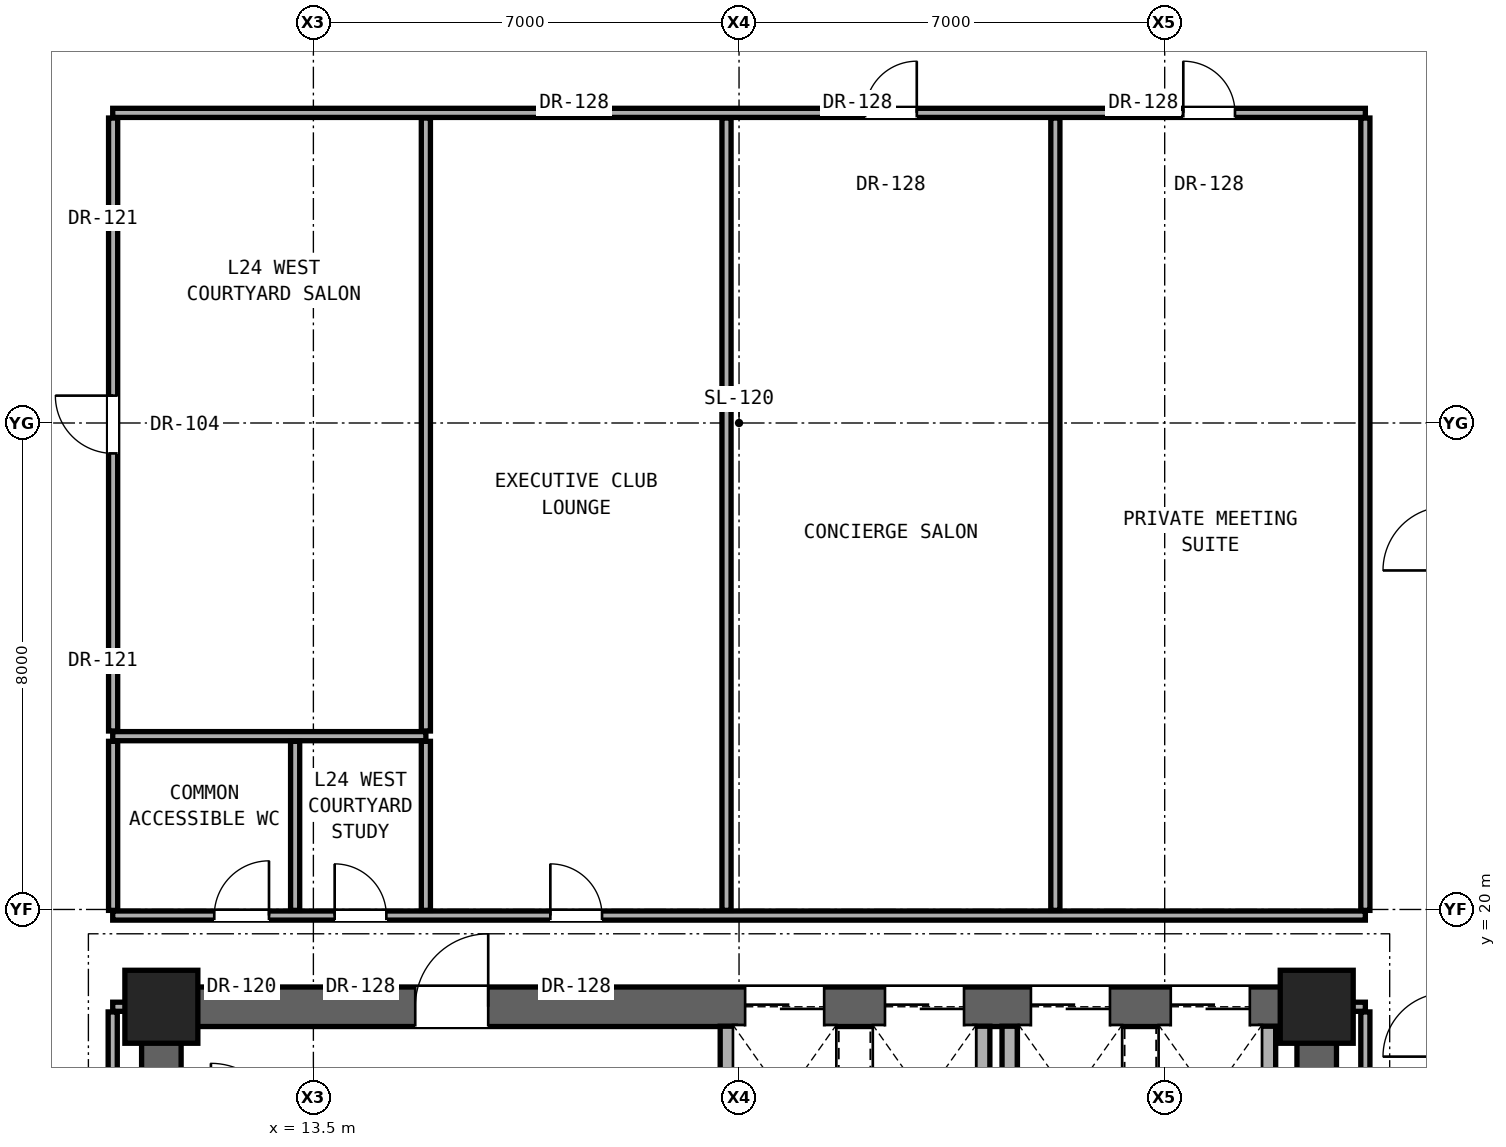
"""IFC4 building model, lengths in metres.
Left out: names, types, materials, properties, quantities, classifications, styles, units other than length and angle.
Written with IfcOpenShell. Run it as: python <this file> out.ifc"""

import sys

from ifc_helpers import new_model, si_unit, direction, frame, frame_2d, origin, origin_2d, place, context, subcontext, project, spatial, rectangle, extrude, element, fill, save


model = new_model("IFC4")
c1 = context("Model", 3, precision=1e-05, world=origin(), true_north=direction((0.0, 1.0)))
c2 = subcontext(c1, "Body", "Model", "MODEL_VIEW")
j1 = project(units=[si_unit("LENGTHUNIT", "METRE"), si_unit("PLANEANGLEUNIT", "RADIAN")], contexts=[c1])
p1 = place(None, origin())
s1 = spatial("IfcSite", under=j1, at=p1, CompositionType="ELEMENT")
p2 = place(p1, origin())
s2 = spatial("IfcBuilding", under=s1, at=p2, CompositionType="ELEMENT")
p3 = place(p2, frame((0.0, 0.0, 88.4)))
s3 = spatial("IfcBuildingStorey", under=s2, at=p3, CompositionType="ELEMENT", Elevation=88.4)
for number, where, z_axis, x_axis in (
    (1, (11.0, 18.4, 0.0), (0.0, 0.0, 1.0), (1.0, 0.0, 0.0)),
    (2, (30.0, 18.4, 0.0), (0.0, 0.0, 1.0), (1.0, 0.0, 0.0)),
):
    element("IfcColumn", number, at=place(p3, frame(where, z_axis=z_axis, x_axis=x_axis)), inside=s3, PredefinedType="COLUMN", context=c2, shape_type="SweptSolid", body=[
        extrude(rectangle(XDim=1.2, YDim=1.2, at=origin_2d()), origin(), (0.0, 0.0, 1.0), 3.3),
    ])
for number, where, z_axis, x_axis in (
    (3, (11.0, 12.4, 0.0), (0.0, 0.0, 1.0), (0.0, 1.0, 0.0)),
    (4, (30.0, 12.4, 0.0), (0.0, 0.0, 1.0), (0.0, 1.0, 0.0)),
):
    element("IfcWall", number, at=place(p3, frame(where, z_axis=z_axis, x_axis=x_axis)), inside=s3, PredefinedType="SHEAR", context=c2, shape_type="SweptSolid", body=[
        extrude(rectangle(XDim=6.0, YDim=0.65, at=frame_2d((3.0, 0.0))), origin(), (0.0, 0.0, 1.0), 3.08),
    ])
p4 = place(p3, frame((11.0, 18.4, 0.0), z_axis=(0.0, 0.0, 1.0), x_axis=(1.0, 0.0, 0.0)))
e5 = element("IfcWall", 5, at=p4, inside=s3, PredefinedType="SHEAR", context=c2, shape_type="SweptSolid", body=[
    extrude(rectangle(XDim=19.0, YDim=0.65, at=frame_2d((9.5, 0.0))), origin(), (0.0, 0.0, 1.0), 3.08),
])
p5 = place(p4, frame((4.175, 0.0, 0.0)))
e6 = element("IfcOpeningElement", 6, at=p5, cuts=e5, PredefinedType="OPENING", context=c2, shape_type="SweptSolid", body=[
    extrude(rectangle(XDim=1.2, YDim=2.25, at=frame_2d((0.6, 1.125))), frame((0.0, 0.335, 0.0), z_axis=(0.0, -1.0, 0.0), x_axis=(1.0, 0.0, 0.0)), (0.0, 0.0, 1.0), 0.67),
])
p6 = place(p4, frame((9.6, 0.0, 0.0)))
e7 = element("IfcOpeningElement", 7, at=p6, cuts=e5, PredefinedType="OPENING", context=c2, shape_type="SweptSolid", body=[
    extrude(rectangle(XDim=1.3, YDim=2.3, at=frame_2d((0.65, 1.15))), frame((0.0, 0.335, 0.0), z_axis=(0.0, -1.0, 0.0), x_axis=(1.0, 0.0, 0.0)), (0.0, 0.0, 1.0), 0.67),
])
p7 = place(p4, frame((11.9, 0.0, 0.0)))
e8 = element("IfcOpeningElement", 8, at=p7, cuts=e5, PredefinedType="OPENING", context=c2, shape_type="SweptSolid", body=[
    extrude(rectangle(XDim=1.3, YDim=2.3, at=frame_2d((0.65, 1.15))), frame((0.0, 0.335, 0.0), z_axis=(0.0, -1.0, 0.0), x_axis=(1.0, 0.0, 0.0)), (0.0, 0.0, 1.0), 0.67),
])
p8 = place(p4, frame((14.3, 0.0, 0.0)))
e9 = element("IfcOpeningElement", 9, at=p8, cuts=e5, PredefinedType="OPENING", context=c2, shape_type="SweptSolid", body=[
    extrude(rectangle(XDim=1.3, YDim=2.3, at=frame_2d((0.65, 1.15))), frame((0.0, 0.335, 0.0), z_axis=(0.0, -1.0, 0.0), x_axis=(1.0, 0.0, 0.0)), (0.0, 0.0, 1.0), 0.67),
])
p9 = place(p4, frame((16.6, 0.0, 0.0)))
e10 = element("IfcOpeningElement", 10, at=p9, cuts=e5, PredefinedType="OPENING", context=c2, shape_type="SweptSolid", body=[
    extrude(rectangle(XDim=1.3, YDim=2.3, at=frame_2d((0.65, 1.15))), frame((0.0, 0.335, 0.0), z_axis=(0.0, -1.0, 0.0), x_axis=(1.0, 0.0, 0.0)), (0.0, 0.0, 1.0), 0.67),
])
for number, where, z_axis, x_axis in (
    (11, (10.2, 18.4, 0.0), (0.0, 0.0, 1.0), (1.0, 0.0, 0.0)),
    (12, (30.32, 18.4, 0.0), (0.0, 0.0, 1.0), (1.0, 0.0, 0.0)),
):
    element("IfcWall", number, at=place(p3, frame(where, z_axis=z_axis, x_axis=x_axis)), inside=s3, PredefinedType="PARTITIONING", context=c2, shape_type="SweptSolid", body=[
        extrude(rectangle(XDim=0.48, YDim=0.15, at=frame_2d((0.24, 0.0))), origin(), (0.0, 0.0, 1.0), 2.456),
    ])
p10 = place(p3, frame((10.2, 19.9, 0.0), z_axis=(0.0, 0.0, 1.0), x_axis=(1.0, 0.0, 0.0)))
e13 = element("IfcWall", 13, at=p10, inside=s3, PredefinedType="PARTITIONING", context=c2, shape_type="SweptSolid", body=[
    extrude(rectangle(XDim=20.6, YDim=0.15, at=frame_2d((10.3, 0.0))), origin(), (0.0, 0.0, 1.0), 2.124),
])
p11 = place(p10, frame((1.67, 0.0, 0.0)))
e14 = element("IfcOpeningElement", 14, at=p11, cuts=e13, PredefinedType="OPENING", context=c2, shape_type="SweptSolid", body=[
    extrude(rectangle(XDim=0.9, YDim=2.1, at=frame_2d((0.45, 1.05))), frame((0.0, 0.085, 0.0), z_axis=(0.0, -1.0, 0.0), x_axis=(1.0, 0.0, 0.0)), (0.0, 0.0, 1.0), 0.17),
])
p12 = place(p10, frame((3.65, 0.0, 0.0)))
e15 = element("IfcOpeningElement", 15, at=p12, cuts=e13, PredefinedType="OPENING", context=c2, shape_type="SweptSolid", body=[
    extrude(rectangle(XDim=0.85, YDim=2.01, at=frame_2d((0.425, 1.005))), frame((0.0, 0.085, 0.0), z_axis=(0.0, -1.0, 0.0), x_axis=(1.0, 0.0, 0.0)), (0.0, 0.0, 1.0), 0.17),
])
p13 = place(p10, frame((7.197, 0.0, 0.0)))
e16 = element("IfcOpeningElement", 16, at=p13, cuts=e13, PredefinedType="OPENING", context=c2, shape_type="SweptSolid", body=[
    extrude(rectangle(XDim=0.85, YDim=2.01, at=frame_2d((0.425, 1.005))), frame((0.0, 0.085, 0.0), z_axis=(0.0, -1.0, 0.0), x_axis=(1.0, 0.0, 0.0)), (0.0, 0.0, 1.0), 0.17),
])
p14 = place(p3, frame((10.2, 22.85, 0.0), z_axis=(0.0, 0.0, 1.0), x_axis=(1.0, 0.0, 0.0)))
e17 = element("IfcWall", 17, at=p14, inside=s3, PredefinedType="PARTITIONING", context=c2, shape_type="SweptSolid", body=[
    extrude(rectangle(XDim=5.15, YDim=0.15, at=frame_2d((2.575, 0.0))), origin(), (0.0, 0.0, 1.0), 2.124),
])
p15 = place(p3, frame((10.2, 33.1, 0.0), z_axis=(0.0, 0.0, 1.0), x_axis=(1.0, 0.0, 0.0)))
e18 = element("IfcWall", 18, at=p15, inside=s3, PredefinedType="PARTITIONING", context=c2, shape_type="SweptSolid", body=[
    extrude(rectangle(XDim=20.6, YDim=0.15, at=frame_2d((10.3, 0.0))), origin(), (0.0, 0.0, 1.0), 2.124),
])
p16 = place(p15, frame((12.373, 0.0, 0.0)))
e19 = element("IfcOpeningElement", 19, at=p16, cuts=e18, PredefinedType="OPENING", context=c2, shape_type="SweptSolid", body=[
    extrude(rectangle(XDim=0.85, YDim=2.01, at=frame_2d((0.425, 1.005))), frame((0.0, 0.085, 0.0), z_axis=(0.0, -1.0, 0.0), x_axis=(1.0, 0.0, 0.0)), (0.0, 0.0, 1.0), 0.17),
])
p17 = place(p15, frame((17.606, 0.0, 0.0)))
e20 = element("IfcOpeningElement", 20, at=p17, cuts=e18, PredefinedType="OPENING", context=c2, shape_type="SweptSolid", body=[
    extrude(rectangle(XDim=0.85, YDim=2.01, at=frame_2d((0.425, 1.005))), frame((0.0, 0.085, 0.0), z_axis=(0.0, -1.0, 0.0), x_axis=(1.0, 0.0, 0.0)), (0.0, 0.0, 1.0), 0.17),
])
p18 = place(p3, frame((10.2, 12.335, 0.0), z_axis=(0.0, 0.0, 1.0), x_axis=(0.0, 1.0, 0.0)))
e21 = element("IfcWall", 21, at=p18, inside=s3, PredefinedType="PARTITIONING", context=c2, shape_type="SweptSolid", body=[
    extrude(rectangle(XDim=5.98, YDim=0.15, at=frame_2d((2.99, 0.0))), origin(), (0.0, 0.0, 1.0), 2.456),
])
p19 = place(p3, frame((10.207, 19.985, 0.0), z_axis=(0.0, 0.0, 1.0), x_axis=(0.0, 1.0, 0.0)))
e22 = element("IfcWall", 22, at=p19, inside=s3, PredefinedType="PARTITIONING", context=c2, shape_type="SweptSolid", body=[
    extrude(rectangle(XDim=2.78, YDim=0.15, at=frame_2d((1.39, 0.0))), origin(), (0.0, 0.0, 1.0), 3.08),
])
p20 = place(p3, frame((10.207, 22.935, 0.0), z_axis=(0.0, 0.0, 1.0), x_axis=(0.0, 1.0, 0.0)))
e23 = element("IfcWall", 23, at=p20, inside=s3, PredefinedType="PARTITIONING", context=c2, shape_type="SweptSolid", body=[
    extrude(rectangle(XDim=10.08, YDim=0.15, at=frame_2d((5.04, 0.0))), origin(), (0.0, 0.0, 1.0), 2.299),
])
p21 = place(p20, frame((4.565, 0.0, 0.0)))
e24 = element("IfcOpeningElement", 24, at=p21, cuts=e23, PredefinedType="OPENING", context=c2, shape_type="SweptSolid", body=[
    extrude(rectangle(XDim=0.95, YDim=2.15, at=frame_2d((0.475, 1.075))), frame((0.0, 0.085, 0.0), z_axis=(0.0, -1.0, 0.0), x_axis=(1.0, 0.0, 0.0)), (0.0, 0.0, 1.0), 0.17),
])
for number, where, z_axis, x_axis in (
    (25, (13.2, 19.985, 0.0), (0.0, 0.0, 1.0), (0.0, 1.0, 0.0)),
    (26, (15.35, 19.985, 0.0), (0.0, 0.0, 1.0), (0.0, 1.0, 0.0)),
):
    element("IfcWall", number, at=place(p3, frame(where, z_axis=z_axis, x_axis=x_axis)), inside=s3, PredefinedType="PARTITIONING", context=c2, shape_type="SweptSolid", body=[
        extrude(rectangle(XDim=2.78, YDim=0.15, at=frame_2d((1.39, 0.0))), origin(), (0.0, 0.0, 1.0), 3.08),
    ])
p22 = place(p3, frame((15.35, 22.935, 0.0), z_axis=(0.0, 0.0, 1.0), x_axis=(0.0, 1.0, 0.0)))
e27 = element("IfcWall", 27, at=p22, inside=s3, PredefinedType="PARTITIONING", context=c2, shape_type="SweptSolid", body=[
    extrude(rectangle(XDim=10.08, YDim=0.15, at=frame_2d((5.04, 0.0))), origin(), (0.0, 0.0, 1.0), 2.124),
])
p23 = place(p3, frame((20.315, 16.555, 0.0), z_axis=(0.0, 0.0, 1.0), x_axis=(0.0, 1.0, 0.0)))
e28 = element("IfcWall", 28, at=p23, inside=s3, PredefinedType="SOLIDWALL", context=c2, shape_type="SweptSolid", body=[
    extrude(rectangle(XDim=1.525, YDim=0.25, at=frame_2d((0.763, 0.0))), origin(), (0.0, 0.0, 1.0), 3.08),
])
p24 = place(p3, frame((20.294, 19.985, 0.0), z_axis=(0.0, 0.0, 1.0), x_axis=(0.0, 1.0, 0.0)))
e29 = element("IfcWall", 29, at=p24, inside=s3, PredefinedType="PARTITIONING", context=c2, shape_type="SweptSolid", body=[
    extrude(rectangle(XDim=13.03, YDim=0.15, at=frame_2d((6.515, 0.0))), origin(), (0.0, 0.0, 1.0), 2.124),
])
for number, where, z_axis, x_axis in (
    (30, (24.5, 15.785, 0.0), (0.0, 0.0, 1.0), (0.0, 1.0, 0.0)),
    (31, (24.95, 15.785, 0.0), (0.0, 0.0, 1.0), (0.0, 1.0, 0.0)),
):
    element("IfcWall", number, at=place(p3, frame(where, z_axis=z_axis, x_axis=x_axis)), inside=s3, PredefinedType="SOLIDWALL", context=c2, shape_type="SweptSolid", body=[
        extrude(rectangle(XDim=2.295, YDim=0.25, at=frame_2d((1.147, 0.0))), origin(), (0.0, 0.0, 1.0), 3.08),
    ])
p25 = place(p3, frame((25.702, 19.985, 0.0), z_axis=(0.0, 0.0, 1.0), x_axis=(0.0, 1.0, 0.0)))
e32 = element("IfcWall", 32, at=p25, inside=s3, PredefinedType="PARTITIONING", context=c2, shape_type="SweptSolid", body=[
    extrude(rectangle(XDim=13.03, YDim=0.15, at=frame_2d((6.515, 0.0))), origin(), (0.0, 0.0, 1.0), 2.124),
])
p26 = place(p3, frame((29.2, 15.785, 0.0), z_axis=(0.0, 0.0, 1.0), x_axis=(0.0, 1.0, 0.0)))
e33 = element("IfcWall", 33, at=p26, inside=s3, PredefinedType="SOLIDWALL", context=c2, shape_type="SweptSolid", body=[
    extrude(rectangle(XDim=2.295, YDim=0.25, at=frame_2d((1.147, 0.0))), origin(), (0.0, 0.0, 1.0), 3.08),
])
p27 = place(p3, frame((30.8, 12.335, 0.0), z_axis=(0.0, 0.0, 1.0), x_axis=(0.0, 1.0, 0.0)))
e34 = element("IfcWall", 34, at=p27, inside=s3, PredefinedType="PARTITIONING", context=c2, shape_type="SweptSolid", body=[
    extrude(rectangle(XDim=5.98, YDim=0.15, at=frame_2d((2.99, 0.0))), origin(), (0.0, 0.0, 1.0), 2.456),
])
p28 = place(p3, frame((30.8, 19.985, 0.0), z_axis=(0.0, 0.0, 1.0), x_axis=(0.0, 1.0, 0.0)))
e35 = element("IfcWall", 35, at=p28, inside=s3, PredefinedType="PARTITIONING", context=c2, shape_type="SweptSolid", body=[
    extrude(rectangle(XDim=13.03, YDim=0.15, at=frame_2d((6.515, 0.0))), origin(), (0.0, 0.0, 1.0), 2.299),
])
p29 = place(p5, origin())
e36 = element("IfcDoor", 36, at=p29, inside=s3, OperationType="SINGLE_SWING_RIGHT", PredefinedType="DOOR", context=c2, shape_type="SweptSolid", body=[
    extrude(rectangle(XDim=1.2, YDim=2.25, at=frame_2d((0.6, 1.125))), frame((0.0, 0.025, 0.0), z_axis=(0.0, -1.0, 0.0), x_axis=(1.0, 0.0, 0.0)), (0.0, 0.0, 1.0), 0.05),
])
fill(e6, e36)
p30 = place(p11, origin())
e37 = element("IfcDoor", 37, at=p30, inside=s3, OperationType="SINGLE_SWING_RIGHT", PredefinedType="DOOR", context=c2, shape_type="SweptSolid", body=[
    extrude(rectangle(XDim=0.9, YDim=2.1, at=frame_2d((0.45, 1.05))), frame((0.0, 0.025, 0.0), z_axis=(0.0, -1.0, 0.0), x_axis=(1.0, 0.0, 0.0)), (0.0, 0.0, 1.0), 0.05),
])
fill(e14, e37)
p31 = place(p12, origin())
e38 = element("IfcDoor", 38, at=p31, inside=s3, OperationType="SINGLE_SWING_LEFT", PredefinedType="DOOR", context=c2, shape_type="SweptSolid", body=[
    extrude(rectangle(XDim=0.85, YDim=2.01, at=frame_2d((0.425, 1.005))), frame((0.0, 0.025, 0.0), z_axis=(0.0, -1.0, 0.0), x_axis=(1.0, 0.0, 0.0)), (0.0, 0.0, 1.0), 0.05),
])
fill(e15, e38)
p32 = place(p21, origin())
e39 = element("IfcDoor", 39, at=p32, inside=s3, OperationType="SINGLE_SWING_RIGHT", PredefinedType="DOOR", context=c2, shape_type="SweptSolid", body=[
    extrude(rectangle(XDim=0.95, YDim=2.15, at=frame_2d((0.475, 1.075))), frame((0.0, 0.025, 0.0), z_axis=(0.0, -1.0, 0.0), x_axis=(1.0, 0.0, 0.0)), (0.0, 0.0, 1.0), 0.05),
])
fill(e24, e39)
p33 = place(p13, origin())
e40 = element("IfcDoor", 40, at=p33, inside=s3, OperationType="SINGLE_SWING_LEFT", PredefinedType="DOOR", context=c2, shape_type="SweptSolid", body=[
    extrude(rectangle(XDim=0.85, YDim=2.01, at=frame_2d((0.425, 1.005))), frame((0.0, 0.025, 0.0), z_axis=(0.0, -1.0, 0.0), x_axis=(1.0, 0.0, 0.0)), (0.0, 0.0, 1.0), 0.05),
])
fill(e16, e40)
p34 = place(p16, origin())
e41 = element("IfcDoor", 41, at=p34, inside=s3, OperationType="SINGLE_SWING_RIGHT", PredefinedType="DOOR", context=c2, shape_type="SweptSolid", body=[
    extrude(rectangle(XDim=0.85, YDim=2.01, at=frame_2d((0.425, 1.005))), frame((0.0, 0.025, 0.0), z_axis=(0.0, -1.0, 0.0), x_axis=(1.0, 0.0, 0.0)), (0.0, 0.0, 1.0), 0.05),
])
fill(e19, e41)
p35 = place(p17, origin())
e42 = element("IfcDoor", 42, at=p35, inside=s3, OperationType="SINGLE_SWING_LEFT", PredefinedType="DOOR", context=c2, shape_type="SweptSolid", body=[
    extrude(rectangle(XDim=0.85, YDim=2.01, at=frame_2d((0.425, 1.005))), frame((0.0, 0.025, 0.0), z_axis=(0.0, -1.0, 0.0), x_axis=(1.0, 0.0, 0.0)), (0.0, 0.0, 1.0), 0.05),
])
fill(e20, e42)
p36 = place(p6, origin())
e43 = element("IfcDoor", 43, at=p36, inside=s3, OperationType="DOUBLE_DOOR_SLIDING", PredefinedType="DOOR", context=c2, shape_type="SweptSolid", body=[
    extrude(rectangle(XDim=1.3, YDim=2.3, at=frame_2d((0.65, 1.15))), frame((0.0, 0.025, 0.0), z_axis=(0.0, -1.0, 0.0), x_axis=(1.0, 0.0, 0.0)), (0.0, 0.0, 1.0), 0.05),
])
fill(e7, e43)
p37 = place(p7, origin())
e44 = element("IfcDoor", 44, at=p37, inside=s3, OperationType="DOUBLE_DOOR_SLIDING", PredefinedType="DOOR", context=c2, shape_type="SweptSolid", body=[
    extrude(rectangle(XDim=1.3, YDim=2.3, at=frame_2d((0.65, 1.15))), frame((0.0, 0.025, 0.0), z_axis=(0.0, -1.0, 0.0), x_axis=(1.0, 0.0, 0.0)), (0.0, 0.0, 1.0), 0.05),
])
fill(e8, e44)
p38 = place(p8, origin())
e45 = element("IfcDoor", 45, at=p38, inside=s3, OperationType="DOUBLE_DOOR_SLIDING", PredefinedType="DOOR", context=c2, shape_type="SweptSolid", body=[
    extrude(rectangle(XDim=1.3, YDim=2.3, at=frame_2d((0.65, 1.15))), frame((0.0, 0.025, 0.0), z_axis=(0.0, -1.0, 0.0), x_axis=(1.0, 0.0, 0.0)), (0.0, 0.0, 1.0), 0.05),
])
fill(e9, e45)
p39 = place(p9, origin())
e46 = element("IfcDoor", 46, at=p39, inside=s3, OperationType="DOUBLE_DOOR_SLIDING", PredefinedType="DOOR", context=c2, shape_type="SweptSolid", body=[
    extrude(rectangle(XDim=1.3, YDim=2.3, at=frame_2d((0.65, 1.15))), frame((0.0, 0.025, 0.0), z_axis=(0.0, -1.0, 0.0), x_axis=(1.0, 0.0, 0.0)), (0.0, 0.0, 1.0), 0.05),
])
fill(e10, e46)
save(model, sys.argv[1])
